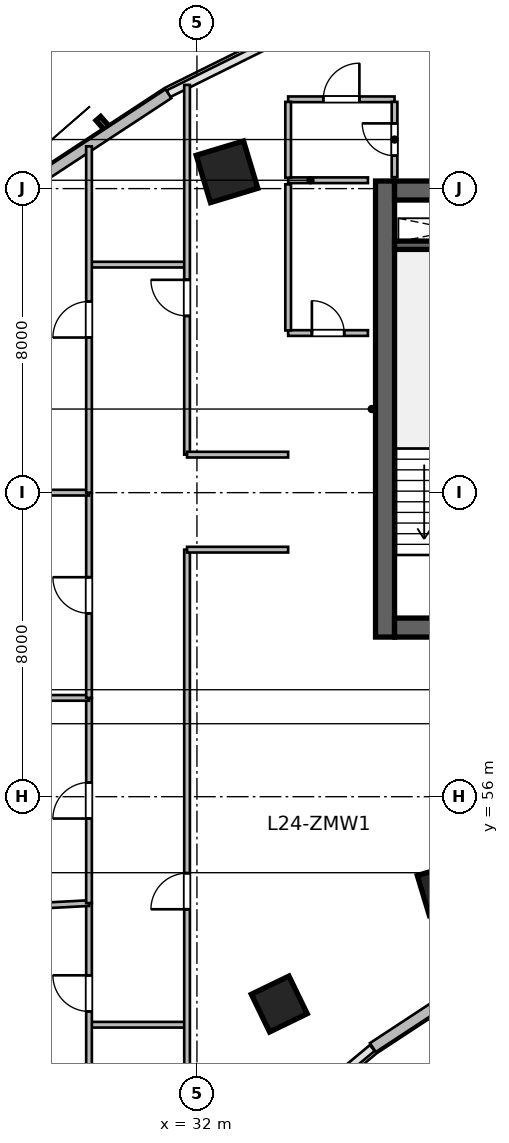
"""IFC4 building model, lengths in metres.
Left out: names, types, materials, properties, quantities, classifications, styles, units other than length and angle.
Written with IfcOpenShell. Run it as: python <this file> out.ifc"""

import sys

from ifc_helpers import new_model, si_unit, direction, frame, frame_2d, origin, origin_2d, place, context, subcontext, project, spatial, rectangle, extrude, source, transform, mapped, element, fill, save


model = new_model("IFC4")
c1 = context("Model", 3, precision=1e-05, world=origin(), true_north=direction((0.0, 1.0)))
c2 = subcontext(c1, "Body", "Model", "MODEL_VIEW")
j1 = project(units=[si_unit("LENGTHUNIT", "METRE"), si_unit("PLANEANGLEUNIT", "RADIAN")], contexts=[c1])
p1 = place(None, origin())
s1 = spatial("IfcSite", under=j1, at=p1, CompositionType="ELEMENT")
p2 = place(p1, origin())
s2 = spatial("IfcBuilding", under=s1, at=p2, CompositionType="ELEMENT")
p3 = place(p2, frame((0.0, 0.0, 103.8)))
s3 = spatial("IfcBuildingStorey", under=s2, at=p3, CompositionType="ELEMENT", Elevation=103.8)
m1 = source(origin(), c2, "Body", "SweptSolid", [
    extrude(rectangle(XDim=12.0, YDim=0.5, at=frame_2d((6.0, 0.0))), origin(), (0.0, 0.0, 1.0), 3.9),
])
p4 = place(p3, frame((36.95, 60.2, 0.0), z_axis=(0.0, 0.0, 1.0), x_axis=(0.0, 1.0, 0.0)))
e1 = element("IfcWall", 1, at=p4, inside=s3, PredefinedType="SHEAR", context=c2, shape_type="MappedRepresentation", body=[
    mapped(m1, transform((0.0, 0.0, 0.0), scale=1.0)),
])
m2 = source(origin(), c2, "Body", "SweptSolid", [
    extrude(rectangle(XDim=21.6, YDim=0.5, at=frame_2d((10.8, 0.0))), origin(), (0.0, 0.0, 1.0), 3.9),
])
p5 = place(p3, frame((37.2, 60.45, 0.0), z_axis=(0.0, 0.0, 1.0), x_axis=(1.0, 0.0, 0.0)))
e2 = element("IfcWall", 2, at=p5, inside=s3, PredefinedType="SHEAR", context=c2, shape_type="MappedRepresentation", body=[
    mapped(m2, transform((0.0, 0.0, 0.0), scale=1.0)),
])
p6 = place(p5, frame((1.1, 0.0, 0.0)))
e3 = element("IfcOpeningElement", 3, at=p6, cuts=e2, PredefinedType="OPENING", context=c2, shape_type="SweptSolid", body=[
    extrude(rectangle(XDim=1.15, YDim=2.15, at=frame_2d((0.575, 1.075))), frame((0.0, 0.26, 0.0), z_axis=(0.0, -1.0, 0.0), x_axis=(1.0, 0.0, 0.0)), (0.0, 0.0, 1.0), 0.52),
])
p7 = place(p5, frame((19.5, 0.0, 0.0)))
e4 = element("IfcOpeningElement", 4, at=p7, cuts=e2, PredefinedType="OPENING", context=c2, shape_type="SweptSolid", body=[
    extrude(rectangle(XDim=0.9, YDim=2.1, at=frame_2d((0.45, 1.05))), frame((0.0, 0.26, 0.0), z_axis=(0.0, -1.0, 0.0), x_axis=(1.0, 0.0, 0.0)), (0.0, 0.0, 1.0), 0.52),
])
p8 = place(p5, frame((12.02, 0.0, 0.0)))
e5 = element("IfcOpeningElement", 5, at=p8, cuts=e2, PredefinedType="OPENING", context=c2, shape_type="SweptSolid", body=[
    extrude(rectangle(XDim=1.6, YDim=2.15, at=frame_2d((0.8, 1.075))), frame((0.0, 0.26, 0.0), z_axis=(0.0, -1.0, 0.0), x_axis=(1.0, 0.0, 0.0)), (0.0, 0.0, 1.0), 0.52),
])
p9 = place(p3, frame((37.2, 71.95, 0.0), z_axis=(0.0, 0.0, 1.0), x_axis=(1.0, 0.0, 0.0)))
e6 = element("IfcWall", 6, at=p9, inside=s3, PredefinedType="SHEAR", context=c2, shape_type="MappedRepresentation", body=[
    mapped(m2, transform((0.0, 0.0, 0.0), scale=1.0)),
])
p10 = place(p9, frame((1.2, 0.0, 0.0)))
e7 = element("IfcOpeningElement", 7, at=p10, cuts=e6, PredefinedType="OPENING", context=c2, shape_type="SweptSolid", body=[
    extrude(rectangle(XDim=0.9, YDim=2.1, at=frame_2d((0.45, 1.05))), frame((0.0, 0.26, 0.0), z_axis=(0.0, -1.0, 0.0), x_axis=(1.0, 0.0, 0.0)), (0.0, 0.0, 1.0), 0.52),
])
p11 = place(p9, frame((14.7, 0.0, 0.0)))
e8 = element("IfcOpeningElement", 8, at=p11, cuts=e6, PredefinedType="OPENING", context=c2, shape_type="SweptSolid", body=[
    extrude(rectangle(XDim=1.2, YDim=2.15, at=frame_2d((0.6, 1.075))), frame((0.0, 0.26, 0.0), z_axis=(0.0, -1.0, 0.0), x_axis=(1.0, 0.0, 0.0)), (0.0, 0.0, 1.0), 0.52),
])
p12 = place(p9, frame((4.15, 0.0, 0.0)))
e9 = element("IfcOpeningElement", 9, at=p12, cuts=e6, PredefinedType="OPENING", context=c2, shape_type="SweptSolid", body=[
    extrude(rectangle(XDim=1.3, YDim=2.15, at=frame_2d((0.65, 1.075))), frame((0.0, 0.26, 0.0), z_axis=(0.0, -1.0, 0.0), x_axis=(1.0, 0.0, 0.0)), (0.0, 0.0, 1.0), 0.52),
])
p13 = place(p9, frame((7.25, 0.0, 0.0)))
e10 = element("IfcOpeningElement", 10, at=p13, cuts=e6, PredefinedType="OPENING", context=c2, shape_type="SweptSolid", body=[
    extrude(rectangle(XDim=0.9, YDim=2.1, at=frame_2d((0.45, 1.05))), frame((0.0, 0.26, 0.0), z_axis=(0.0, -1.0, 0.0), x_axis=(1.0, 0.0, 0.0)), (0.0, 0.0, 1.0), 0.52),
])
p14 = place(p9, frame((10.95, 0.0, 0.0)))
e11 = element("IfcOpeningElement", 11, at=p14, cuts=e6, PredefinedType="OPENING", context=c2, shape_type="SweptSolid", body=[
    extrude(rectangle(XDim=0.9, YDim=2.1, at=frame_2d((0.45, 1.05))), frame((0.0, 0.26, 0.0), z_axis=(0.0, -1.0, 0.0), x_axis=(1.0, 0.0, 0.0)), (0.0, 0.0, 1.0), 0.52),
])
m3 = source(origin(), c2, "Body", "SweptSolid", [
    extrude(rectangle(XDim=3.27, YDim=0.22, at=frame_2d((1.635, 0.0))), origin(), (0.0, 0.0, 1.0), 3.9),
])
p15 = place(p3, frame((37.2, 70.51, 0.0), z_axis=(0.0, 0.0, 1.0), x_axis=(1.0, 0.0, 0.0)))
e12 = element("IfcWall", 12, at=p15, inside=s3, PredefinedType="SHEAR", context=c2, shape_type="MappedRepresentation", body=[
    mapped(m3, transform((0.0, 0.0, 0.0), scale=1.0)),
])
m4 = source(origin(), c2, "Body", "SweptSolid", [
    extrude(rectangle(XDim=1.1, YDim=1.1, at=origin_2d()), origin(), (0.0, 0.0, 1.0), 3.9),
])
for number, where, z_axis, x_axis in (
    (13, (34.166, 50.545, 0.0), (0.0, 0.0, 1.0), (-0.436, 0.9, 0.0)),
    (14, (38.485, 53.558, 0.0), (0.0, 0.0, 1.0), (-0.289, 0.957, 0.0)),
):
    element("IfcColumn", number, at=place(p3, frame(where, z_axis=z_axis, x_axis=x_axis)), inside=s3, PredefinedType="COLUMN", context=c2, shape_type="MappedRepresentation", body=[
        mapped(m4, transform((0.0, 0.0, 0.0), scale=1.0)),
    ])
m5 = source(origin(), c2, "Body", "SweptSolid", [
    extrude(rectangle(XDim=1.3, YDim=1.3, at=origin_2d()), origin(), (0.0, 0.0, 1.0), 3.9),
])
p16 = place(p3, frame((32.791, 72.442, 0.0), z_axis=(0.0, 0.0, 1.0), x_axis=(-0.288697611798, 0.957420330337, 0.0)))
e15 = element("IfcColumn", 15, at=p16, inside=s3, PredefinedType="COLUMN", context=c2, shape_type="MappedRepresentation", body=[
    mapped(m5, transform((0.0, 0.0, 0.0), scale=1.0)),
])
m6 = source(origin(), c2, "Body", "SweptSolid", [
    extrude(rectangle(XDim=2.527, YDim=0.28, at=frame_2d((1.264, 0.0))), origin(), (0.0, 0.0, 1.0), 3.65),
])
p17 = place(p3, frame((38.742, 50.786, 0.0), z_axis=(0.0, 0.0, 1.0), x_axis=(-0.836011905051, -0.548711303523, 0.0)))
e16 = element("IfcWall", 16, at=p17, inside=s3, PredefinedType="SOLIDWALL", context=c2, shape_type="MappedRepresentation", body=[
    mapped(m6, transform((0.0, 0.0, 0.0), scale=1.0)),
])
m7 = source(origin(), c2, "Body", "SweptSolid", [
    extrude(rectangle(XDim=4.626, YDim=0.28, at=frame_2d((2.313, 0.0))), origin(), (0.0, 0.0, 1.0), 3.65),
])
p18 = place(p3, frame((27.382, 71.958, 0.0), z_axis=(0.0, 0.0, 1.0), x_axis=(0.83595938331, 0.548791316855, 0.0)))
e17 = element("IfcWall", 17, at=p18, inside=s3, PredefinedType="SOLIDWALL", context=c2, shape_type="MappedRepresentation", body=[
    mapped(m7, transform((0.0, 0.0, 0.0), scale=1.0)),
])
m8 = source(origin(), c2, "Body", "SweptSolid", [
    extrude(rectangle(XDim=2.1, YDim=0.15, at=frame_2d((1.05, 0.0))), origin(), (0.0, 0.0, 1.0), 3.65),
])
p19 = place(p3, frame((34.4, 72.22, 0.0), z_axis=(0.0, 0.0, 1.0), x_axis=(1.0, 0.0, 0.0)))
e18 = element("IfcWall", 18, at=p19, inside=s3, PredefinedType="PARTITIONING", context=c2, shape_type="MappedRepresentation", body=[
    mapped(m8, transform((0.0, 0.0, 0.0), scale=1.0)),
])
m9 = source(origin(), c2, "Body", "SweptSolid", [
    extrude(rectangle(XDim=2.8, YDim=0.15, at=frame_2d((1.4, 0.0))), origin(), (0.0, 0.0, 1.0), 3.65),
])
p20 = place(p3, frame((34.4, 74.35, 0.0), z_axis=(0.0, 0.0, 1.0), x_axis=(1.0, 0.0, 0.0)))
e19 = element("IfcWall", 19, at=p20, inside=s3, PredefinedType="PARTITIONING", context=c2, shape_type="MappedRepresentation", body=[
    mapped(m9, transform((0.0, 0.0, 0.0), scale=1.0)),
])
p21 = place(p20, frame((0.925, 0.0, 0.0)))
e20 = element("IfcOpeningElement", 20, at=p21, cuts=e19, PredefinedType="OPENING", context=c2, shape_type="SweptSolid", body=[
    extrude(rectangle(XDim=0.95, YDim=2.1, at=frame_2d((0.475, 1.05))), frame((0.0, 0.085, 0.0), z_axis=(0.0, -1.0, 0.0), x_axis=(1.0, 0.0, 0.0)), (0.0, 0.0, 1.0), 0.17),
])
m10 = source(origin(), c2, "Body", "SweptSolid", [
    extrude(rectangle(XDim=1.995, YDim=0.15, at=frame_2d((0.998, 0.0))), origin(), (0.0, 0.0, 1.0), 3.65),
])
p22 = place(p3, frame((34.4, 72.288, 0.0), z_axis=(0.0, 0.0, 1.0), x_axis=(0.0, 1.0, 0.0)))
e21 = element("IfcWall", 21, at=p22, inside=s3, PredefinedType="PARTITIONING", context=c2, shape_type="MappedRepresentation", body=[
    mapped(m10, transform((0.0, 0.0, 0.0), scale=1.0)),
])
m11 = source(origin(), c2, "Body", "SweptSolid", [
    extrude(rectangle(XDim=1.982, YDim=0.15, at=frame_2d((0.991, 0.0))), origin(), (0.0, 0.0, 1.0), 3.65),
])
p23 = place(p3, frame((37.2, 72.3, 0.0), z_axis=(0.0, 0.0, 1.0), x_axis=(0.0, 1.0, 0.0)))
e22 = element("IfcWall", 22, at=p23, inside=s3, PredefinedType="PARTITIONING", context=c2, shape_type="MappedRepresentation", body=[
    mapped(m11, transform((0.0, 0.0, 0.0), scale=1.0)),
])
p24 = place(p23, frame((0.566, 0.0, 0.0)))
e23 = element("IfcOpeningElement", 23, at=p24, cuts=e22, PredefinedType="OPENING", context=c2, shape_type="SweptSolid", body=[
    extrude(rectangle(XDim=0.85, YDim=2.1, at=frame_2d((0.425, 1.05))), frame((0.0, 0.085, 0.0), z_axis=(0.0, -1.0, 0.0), x_axis=(1.0, 0.0, 0.0)), (0.0, 0.0, 1.0), 0.17),
])
p25 = place(p3, frame((34.4, 68.2, 0.0), z_axis=(0.0, 0.0, 1.0), x_axis=(1.0, 0.0, 0.0)))
e24 = element("IfcWall", 24, at=p25, inside=s3, PredefinedType="PARTITIONING", context=c2, shape_type="MappedRepresentation", body=[
    mapped(m8, transform((0.0, 0.0, 0.0), scale=1.0)),
])
p26 = place(p25, frame((0.625, 0.0, 0.0)))
e25 = element("IfcOpeningElement", 25, at=p26, cuts=e24, PredefinedType="OPENING", context=c2, shape_type="SweptSolid", body=[
    extrude(rectangle(XDim=0.85, YDim=2.1, at=frame_2d((0.425, 1.05))), frame((0.0, 0.085, 0.0), z_axis=(0.0, -1.0, 0.0), x_axis=(1.0, 0.0, 0.0)), (0.0, 0.0, 1.0), 0.17),
])
m12 = source(origin(), c2, "Body", "SweptSolid", [
    extrude(rectangle(XDim=3.845, YDim=0.15, at=frame_2d((1.922, 0.0))), origin(), (0.0, 0.0, 1.0), 3.65),
])
p27 = place(p3, frame((34.4, 68.268, 0.0), z_axis=(0.0, 0.0, 1.0), x_axis=(0.0, 1.0, 0.0)))
e26 = element("IfcWall", 26, at=p27, inside=s3, PredefinedType="PARTITIONING", context=c2, shape_type="MappedRepresentation", body=[
    mapped(m12, transform((0.0, 0.0, 0.0), scale=1.0)),
])
m13 = source(origin(), c2, "Body", "SweptSolid", [
    extrude(rectangle(XDim=2.5, YDim=0.15, at=frame_2d((1.25, 0.0))), origin(), (0.0, 0.0, 1.0), 3.65),
])
p28 = place(p3, frame((29.2, 50.0, 0.0), z_axis=(0.0, 0.0, 1.0), x_axis=(1.0, 0.0, 0.0)))
e27 = element("IfcWall", 27, at=p28, inside=s3, PredefinedType="PARTITIONING", context=c2, shape_type="MappedRepresentation", body=[
    mapped(m13, transform((0.0, 0.0, 0.0), scale=1.0)),
])
m14 = source(origin(), c2, "Body", "SweptSolid", [
    extrude(rectangle(XDim=2.5, YDim=0.15, at=frame_2d((1.25, 0.0))), origin(), (0.0, 0.0, 1.0), 3.022),
])
p29 = place(p3, frame((29.2, 70.0, 0.0), z_axis=(0.0, 0.0, 1.0), x_axis=(1.0, 0.0, 0.0)))
e28 = element("IfcWall", 28, at=p29, inside=s3, PredefinedType="PARTITIONING", context=c2, shape_type="MappedRepresentation", body=[
    mapped(m14, transform((0.0, 0.0, 0.0), scale=1.0)),
])
m15 = source(origin(), c2, "Body", "SweptSolid", [
    extrude(rectangle(XDim=12.594, YDim=0.15, at=frame_2d((6.297, 0.0))), origin(), (0.0, 0.0, 1.0), 2.942),
])
p30 = place(p3, frame((29.16, 40.606, 0.0), z_axis=(0.0, 0.0, 1.0), x_axis=(0.0, 1.0, 0.0)))
e29 = element("IfcWall", 29, at=p30, inside=s3, PredefinedType="PARTITIONING", context=c2, shape_type="MappedRepresentation", body=[
    mapped(m15, transform((0.0, 0.0, 0.0), scale=1.0)),
])
p31 = place(p30, frame((9.744, 0.0, 0.0)))
e30 = element("IfcOpeningElement", 30, at=p31, cuts=e29, PredefinedType="OPENING", context=c2, shape_type="SweptSolid", body=[
    extrude(rectangle(XDim=0.95, YDim=2.1, at=frame_2d((0.475, 1.05))), frame((0.0, 0.085, 0.0), z_axis=(0.0, -1.0, 0.0), x_axis=(1.0, 0.0, 0.0)), (0.0, 0.0, 1.0), 0.17),
])
m16 = source(origin(), c2, "Body", "SweptSolid", [
    extrude(rectangle(XDim=17.132, YDim=0.15, at=frame_2d((8.566, 0.0))), origin(), (0.0, 0.0, 1.0), 3.65),
])
p32 = place(p3, frame((12.052, 52.294, 0.0), z_axis=(0.0, 0.0, 1.0), x_axis=(0.998601444231, 0.05286923094, 0.0)))
e31 = element("IfcWall", 31, at=p32, inside=s3, PredefinedType="PARTITIONING", context=c2, shape_type="MappedRepresentation", body=[
    mapped(m16, transform((0.0, 0.0, 0.0), scale=1.0)),
])
m17 = source(origin(), c2, "Body", "SweptSolid", [
    extrude(rectangle(XDim=5.4, YDim=0.15, at=frame_2d((2.7, 0.0))), origin(), (0.0, 0.0, 1.0), 3.022),
])
p33 = place(p3, frame((29.16, 53.2, 0.0), z_axis=(0.0, 0.0, 1.0), x_axis=(0.0, 1.0, 0.0)))
e32 = element("IfcWall", 32, at=p33, inside=s3, PredefinedType="PARTITIONING", context=c2, shape_type="MappedRepresentation", body=[
    mapped(m17, transform((0.0, 0.0, 0.0), scale=1.0)),
])
p34 = place(p33, frame((2.225, 0.0, 0.0)))
e33 = element("IfcOpeningElement", 33, at=p34, cuts=e32, PredefinedType="OPENING", context=c2, shape_type="SweptSolid", body=[
    extrude(rectangle(XDim=0.95, YDim=2.1, at=frame_2d((0.475, 1.05))), frame((0.0, 0.085, 0.0), z_axis=(0.0, -1.0, 0.0), x_axis=(1.0, 0.0, 0.0)), (0.0, 0.0, 1.0), 0.17),
])
m18 = source(origin(), c2, "Body", "SweptSolid", [
    extrude(rectangle(XDim=13.757, YDim=0.15, at=frame_2d((6.878, 0.0))), origin(), (0.0, 0.0, 1.0), 3.65),
])
p35 = place(p3, frame((15.403, 58.6, 0.0), z_axis=(0.0, 0.0, 1.0), x_axis=(1.0, 0.0, 0.0)))
e34 = element("IfcWall", 34, at=p35, inside=s3, PredefinedType="PARTITIONING", context=c2, shape_type="MappedRepresentation", body=[
    mapped(m18, transform((0.0, 0.0, 0.0), scale=1.0)),
])
m19 = source(origin(), c2, "Body", "SweptSolid", [
    extrude(rectangle(XDim=5.4, YDim=0.15, at=frame_2d((2.7, 0.0))), origin(), (0.0, 0.0, 1.0), 2.942),
])
p36 = place(p3, frame((29.16, 58.6, 0.0), z_axis=(0.0, 0.0, 1.0), x_axis=(0.0, 1.0, 0.0)))
e35 = element("IfcWall", 35, at=p36, inside=s3, PredefinedType="PARTITIONING", context=c2, shape_type="MappedRepresentation", body=[
    mapped(m19, transform((0.0, 0.0, 0.0), scale=1.0)),
])
p37 = place(p36, frame((2.225, 0.0, 0.0)))
e36 = element("IfcOpeningElement", 36, at=p37, cuts=e35, PredefinedType="OPENING", context=c2, shape_type="SweptSolid", body=[
    extrude(rectangle(XDim=0.95, YDim=2.1, at=frame_2d((0.475, 1.05))), frame((0.0, 0.085, 0.0), z_axis=(0.0, -1.0, 0.0), x_axis=(1.0, 0.0, 0.0)), (0.0, 0.0, 1.0), 0.17),
])
m20 = source(origin(), c2, "Body", "SweptSolid", [
    extrude(rectangle(XDim=9.914, YDim=0.15, at=frame_2d((4.957, 0.0))), origin(), (0.0, 0.0, 1.0), 3.65),
])
p38 = place(p3, frame((19.246, 64.0, 0.0), z_axis=(0.0, 0.0, 1.0), x_axis=(1.0, 0.0, 0.0)))
e37 = element("IfcWall", 37, at=p38, inside=s3, PredefinedType="PARTITIONING", context=c2, shape_type="MappedRepresentation", body=[
    mapped(m20, transform((0.0, 0.0, 0.0), scale=1.0)),
])
m21 = source(origin(), c2, "Body", "SweptSolid", [
    extrude(rectangle(XDim=9.113, YDim=0.15, at=frame_2d((4.557, 0.0))), origin(), (0.0, 0.0, 1.0), 3.65),
])
p39 = place(p3, frame((29.16, 64.0, 0.0), z_axis=(0.0, 0.0, 1.0), x_axis=(0.0, 1.0, 0.0)))
e38 = element("IfcWall", 38, at=p39, inside=s3, PredefinedType="PARTITIONING", context=c2, shape_type="MappedRepresentation", body=[
    mapped(m21, transform((0.0, 0.0, 0.0), scale=1.0)),
])
p40 = place(p39, frame((4.082, 0.0, 0.0)))
e39 = element("IfcOpeningElement", 39, at=p40, cuts=e38, PredefinedType="OPENING", context=c2, shape_type="SweptSolid", body=[
    extrude(rectangle(XDim=0.95, YDim=2.1, at=frame_2d((0.475, 1.05))), frame((0.0, 0.085, 0.0), z_axis=(0.0, -1.0, 0.0), x_axis=(1.0, 0.0, 0.0)), (0.0, 0.0, 1.0), 0.17),
])
m22 = source(origin(), c2, "Body", "SweptSolid", [
    extrude(rectangle(XDim=17.974, YDim=0.15, at=frame_2d((8.987, 0.0))), origin(), (0.0, 0.0, 1.0), 2.942),
])
p41 = place(p3, frame((31.74, 44.526, 0.0), z_axis=(0.0, 0.0, 1.0), x_axis=(0.0, 1.0, 0.0)))
e40 = element("IfcWall", 40, at=p41, inside=s3, PredefinedType="PARTITIONING", context=c2, shape_type="MappedRepresentation", body=[
    mapped(m22, transform((0.0, 0.0, 0.0), scale=1.0)),
])
p42 = place(p41, frame((8.512, 0.0, 0.0)))
e41 = element("IfcOpeningElement", 41, at=p42, cuts=e40, PredefinedType="OPENING", context=c2, shape_type="SweptSolid", body=[
    extrude(rectangle(XDim=0.95, YDim=2.1, at=frame_2d((0.475, 1.05))), frame((0.0, 0.085, 0.0), z_axis=(0.0, -1.0, 0.0), x_axis=(1.0, 0.0, 0.0)), (0.0, 0.0, 1.0), 0.17),
])
m23 = source(origin(), c2, "Body", "SweptSolid", [
    extrude(rectangle(XDim=2.66, YDim=0.15, at=frame_2d((1.33, 0.0))), origin(), (0.0, 0.0, 1.0), 3.65),
])
p43 = place(p3, frame((31.74, 62.5, 0.0), z_axis=(0.0, 0.0, 1.0), x_axis=(1.0, 0.0, 0.0)))
e42 = element("IfcWall", 42, at=p43, inside=s3, PredefinedType="PARTITIONING", context=c2, shape_type="MappedRepresentation", body=[
    mapped(m23, transform((0.0, 0.0, 0.0), scale=1.0)),
])
m24 = source(origin(), c2, "Body", "SweptSolid", [
    extrude(rectangle(XDim=9.729, YDim=0.15, at=frame_2d((4.864, 0.0))), origin(), (0.0, 0.0, 1.0), 3.65),
])
p44 = place(p3, frame((31.74, 65.0, 0.0), z_axis=(0.0, 0.0, 1.0), x_axis=(0.0, 1.0, 0.0)))
e43 = element("IfcWall", 43, at=p44, inside=s3, PredefinedType="PARTITIONING", context=c2, shape_type="MappedRepresentation", body=[
    mapped(m24, transform((0.0, 0.0, 0.0), scale=1.0)),
])
p45 = place(p44, frame((3.65, 0.0, 0.0)))
e44 = element("IfcOpeningElement", 44, at=p45, cuts=e43, PredefinedType="OPENING", context=c2, shape_type="SweptSolid", body=[
    extrude(rectangle(XDim=0.95, YDim=2.1, at=frame_2d((0.475, 1.05))), frame((0.0, 0.085, 0.0), z_axis=(0.0, -1.0, 0.0), x_axis=(1.0, 0.0, 0.0)), (0.0, 0.0, 1.0), 0.17),
])
p46 = place(p3, frame((31.74, 65.0, 0.0), z_axis=(0.0, 0.0, 1.0), x_axis=(1.0, 0.0, 0.0)))
e45 = element("IfcWall", 45, at=p46, inside=s3, PredefinedType="PARTITIONING", context=c2, shape_type="MappedRepresentation", body=[
    mapped(m23, transform((0.0, 0.0, 0.0), scale=1.0)),
])
m25 = source(origin(), c2, "Body", "SweptSolid", [
    extrude(rectangle(XDim=0.85, YDim=2.1, at=frame_2d((0.425, 1.05))), frame((0.0, 0.025, 0.0), z_axis=(0.0, -1.0, 0.0), x_axis=(1.0, 0.0, 0.0)), (0.0, 0.0, 1.0), 0.05),
])
p47 = place(p24, origin())
e46 = element("IfcDoor", 46, at=p47, inside=s3, OperationType="SINGLE_SWING_RIGHT", PredefinedType="DOOR", context=c2, shape_type="MappedRepresentation", body=[
    mapped(m25, transform((0.0, 0.0, 0.0), scale=1.0)),
])
fill(e23, e46)
p48 = place(p26, origin())
e47 = element("IfcDoor", 47, at=p48, inside=s3, OperationType="SINGLE_SWING_LEFT", PredefinedType="DOOR", context=c2, shape_type="MappedRepresentation", body=[
    mapped(m25, transform((0.0, 0.0, 0.0), scale=1.0)),
])
fill(e25, e47)
m26 = source(origin(), c2, "Body", "SweptSolid", [
    extrude(rectangle(XDim=0.95, YDim=2.1, at=frame_2d((0.475, 1.05))), frame((0.0, 0.025, 0.0), z_axis=(0.0, -1.0, 0.0), x_axis=(1.0, 0.0, 0.0)), (0.0, 0.0, 1.0), 0.05),
])
p49 = place(p31, origin())
e48 = element("IfcDoor", 48, at=p49, inside=s3, OperationType="SINGLE_SWING_RIGHT", PredefinedType="DOOR", context=c2, shape_type="MappedRepresentation", body=[
    mapped(m26, transform((0.0, 0.0, 0.0), scale=1.0)),
])
fill(e30, e48)
p50 = place(p34, origin())
e49 = element("IfcDoor", 49, at=p50, inside=s3, OperationType="SINGLE_SWING_LEFT", PredefinedType="DOOR", context=c2, shape_type="MappedRepresentation", body=[
    mapped(m26, transform((0.0, 0.0, 0.0), scale=1.0)),
])
fill(e33, e49)
p51 = place(p37, origin())
e50 = element("IfcDoor", 50, at=p51, inside=s3, OperationType="SINGLE_SWING_RIGHT", PredefinedType="DOOR", context=c2, shape_type="MappedRepresentation", body=[
    mapped(m26, transform((0.0, 0.0, 0.0), scale=1.0)),
])
fill(e36, e50)
p52 = place(p40, origin())
e51 = element("IfcDoor", 51, at=p52, inside=s3, OperationType="SINGLE_SWING_LEFT", PredefinedType="DOOR", context=c2, shape_type="MappedRepresentation", body=[
    mapped(m26, transform((0.0, 0.0, 0.0), scale=1.0)),
])
fill(e39, e51)
p53 = place(p21, origin())
e52 = element("IfcDoor", 52, at=p53, inside=s3, OperationType="SINGLE_SWING_RIGHT", PredefinedType="DOOR", context=c2, shape_type="MappedRepresentation", body=[
    mapped(m26, transform((0.0, 0.0, 0.0), scale=1.0)),
])
fill(e20, e52)
p54 = place(p42, origin())
e53 = element("IfcDoor", 53, at=p54, inside=s3, OperationType="SINGLE_SWING_LEFT", PredefinedType="DOOR", context=c2, shape_type="MappedRepresentation", body=[
    mapped(m26, transform((0.0, 0.0, 0.0), scale=1.0)),
])
fill(e41, e53)
p55 = place(p45, origin())
e54 = element("IfcDoor", 54, at=p55, inside=s3, OperationType="SINGLE_SWING_RIGHT", PredefinedType="DOOR", context=c2, shape_type="MappedRepresentation", body=[
    mapped(m26, transform((0.0, 0.0, 0.0), scale=1.0)),
])
fill(e44, e54)
save(model, sys.argv[1])
